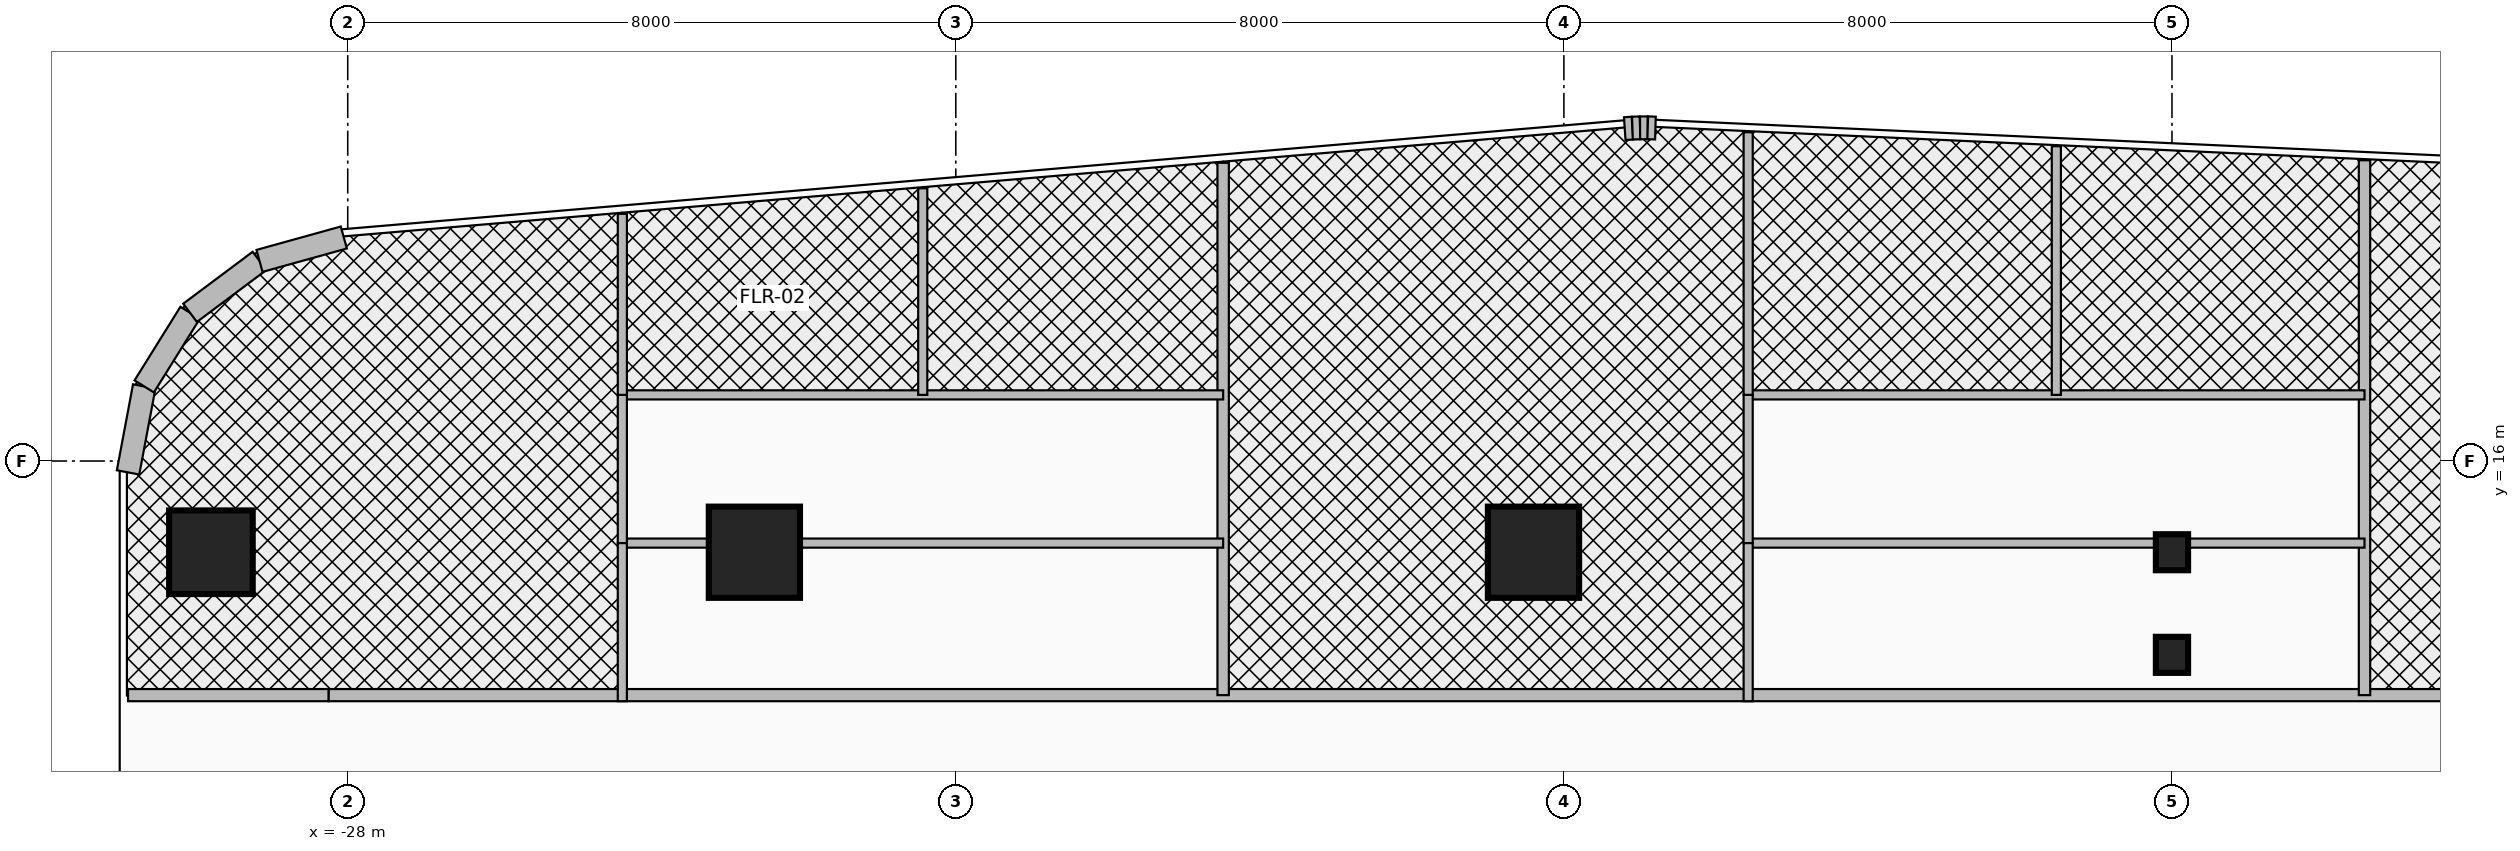
"""IFC4 building model, lengths in metres.
Left out: names, types, materials, properties, quantities, classifications, styles, units other than length and angle.
Written with IfcOpenShell. Run it as: python <this file> out.ifc"""

import sys

from ifc_helpers import new_model, si_unit, direction, frame, frame_2d, origin, origin_2d, place, context, subcontext, project, spatial, rectangle, circle, i_section, extrude, source, transform, mapped, element, fill, save


model = new_model("IFC4")
c1 = context("Model", 3, precision=1e-05, world=origin(), true_north=direction((0.0, 1.0)))
c2 = subcontext(c1, "Body", "Model", "MODEL_VIEW")
j1 = project(units=[si_unit("LENGTHUNIT", "METRE"), si_unit("PLANEANGLEUNIT", "RADIAN")], contexts=[c1])
p1 = place(None, origin())
s1 = spatial("IfcSite", under=j1, at=p1, CompositionType="ELEMENT")
p2 = place(p1, origin())
s2 = spatial("IfcBuilding", under=s1, at=p2, CompositionType="ELEMENT")
p3 = place(p2, frame((0.0, 0.0, 109.4)))
s3 = spatial("IfcBuildingStorey", under=s2, at=p3, CompositionType="ELEMENT", Elevation=109.4)
m1 = source(origin(), c2, "Body", "SweptSolid", [
    extrude(circle(Radius=0.55, at=origin_2d()), origin(), (0.0, 0.0, 1.0), 3.7),
])
p4 = place(p3, frame((-29.8, 14.8, 0.0), z_axis=(0.0, 0.0, 1.0), x_axis=(1.0, 0.0, 0.0)))
e1 = element("IfcColumn", 1, at=p4, inside=s3, PredefinedType="COLUMN", context=c2, shape_type="MappedRepresentation", body=[
    mapped(m1, transform((0.0, 0.0, 0.0), x_axis=(1.0, 0.0, 0.0), y_axis=(0.0, 1.0, 0.0), z_axis=(0.0, 0.0, 1.0), scale=1.0)),
])
m2 = source(origin(), c2, "Body", "SweptSolid", [
    extrude(rectangle(XDim=1.2, YDim=1.2, at=origin_2d()), origin(), (0.0, 0.0, 1.0), 3.7),
])
for number, where, z_axis, x_axis in (
    (2, (-22.65, 14.8, 0.0), (0.0, 0.0, 1.0), (1.0, 0.0, 0.0)),
    (3, (-12.4, 14.8, 0.0), (0.0, 0.0, 1.0), (1.0, 0.0, 0.0)),
):
    element("IfcColumn", number, at=place(p3, frame(where, z_axis=z_axis, x_axis=x_axis)), inside=s3, PredefinedType="COLUMN", context=c2, shape_type="MappedRepresentation", body=[
        mapped(m2, transform((0.0, 0.0, 0.0), x_axis=(1.0, 0.0, 0.0), y_axis=(0.0, 1.0, 0.0), z_axis=(0.0, 0.0, 1.0), scale=1.0)),
    ])
m3 = source(origin(), c2, "Body", "SweptSolid", [
    extrude(i_section(OverallWidth=0.424, OverallDepth=0.474, WebThickness=0.048, FlangeThickness=0.077, at=origin_2d()), origin(), (0.0, 0.0, 1.0), 3.7),
])
for number, where, z_axis, x_axis in (
    (4, (-4.0, 13.45, 0.0), (0.0, 0.0, 1.0), (1.0, 0.0, 0.0)),
    (5, (-4.0, 14.8, 0.0), (0.0, 0.0, 1.0), (1.0, 0.0, 0.0)),
):
    element("IfcColumn", number, at=place(p3, frame(where, z_axis=z_axis, x_axis=x_axis)), inside=s3, PredefinedType="COLUMN", context=c2, shape_type="MappedRepresentation", body=[
        mapped(m3, transform((0.0, 0.0, 0.0), x_axis=(1.0, 0.0, 0.0), y_axis=(0.0, 1.0, 0.0), z_axis=(0.0, 0.0, 1.0), scale=1.0)),
    ])
p5 = place(p3, frame((-30.89, 15.85, 0.0), z_axis=(0.0, 0.0, 1.0), x_axis=(0.184557499391, 0.982821718023, 0.0)))
e6 = element("IfcWall", 6, at=p5, inside=s3, PredefinedType="SOLIDWALL", context=c2, shape_type="SweptSolid", body=[
    extrude(rectangle(XDim=1.151, YDim=0.3, at=frame_2d((0.575, 0.0))), origin(), (0.0, 0.0, 1.0), 3.46),
])
p6 = place(p3, frame((-30.677, 16.981, 0.0), z_axis=(0.0, 0.0, 1.0), x_axis=(0.52880576008, 0.848742875143, 0.0)))
e7 = element("IfcWall", 7, at=p6, inside=s3, PredefinedType="SOLIDWALL", context=c2, shape_type="SweptSolid", body=[
    extrude(rectangle(XDim=1.141, YDim=0.3, at=frame_2d((0.57, 0.0))), origin(), (0.0, 0.0, 1.0), 3.46),
])
p7 = place(p3, frame((-30.074, 17.95, 0.0), z_axis=(0.0, 0.0, 1.0), x_axis=(0.800975009324, 0.598697782223, 0.0)))
e8 = element("IfcWall", 8, at=p7, inside=s3, PredefinedType="SOLIDWALL", context=c2, shape_type="SweptSolid", body=[
    extrude(rectangle(XDim=1.141, YDim=0.3, at=frame_2d((0.57, 0.0))), origin(), (0.0, 0.0, 1.0), 3.46),
])
p8 = place(p3, frame((-29.161, 18.633, 0.0), z_axis=(0.0, 0.0, 1.0), x_axis=(0.963624193367, 0.267260947313, 0.0)))
e9 = element("IfcWall", 9, at=p8, inside=s3, PredefinedType="SOLIDWALL", context=c2, shape_type="SweptSolid", body=[
    extrude(rectangle(XDim=1.151, YDim=0.3, at=frame_2d((0.575, 0.0))), origin(), (0.0, 0.0, 1.0), 3.46),
])
p9 = place(p3, frame((-11.199, 20.373, 0.0), z_axis=(0.0, 0.0, 1.0), x_axis=(0.997567332166, 0.069709524416, 0.0)))
e10 = element("IfcWall", 10, at=p9, inside=s3, PredefinedType="SOLIDWALL", context=c2, shape_type="SweptSolid", body=[
    extrude(rectangle(XDim=0.102, YDim=0.3, at=frame_2d((0.051, 0.0))), origin(), (0.0, 0.0, 1.0), 3.46),
])
p10 = place(p3, frame((-11.098, 20.38, 0.0), z_axis=(0.0, 0.0, 1.0), x_axis=(0.999334672785, 0.03647206835, 0.0)))
e11 = element("IfcWall", 11, at=p10, inside=s3, PredefinedType="SOLIDWALL", context=c2, shape_type="SweptSolid", body=[
    extrude(rectangle(XDim=0.1, YDim=0.3, at=frame_2d((0.05, 0.0))), origin(), (0.0, 0.0, 1.0), 3.46),
])
p11 = place(p3, frame((-10.998, 20.383, 0.0), z_axis=(0.0, 0.0, 1.0), x_axis=(0.999997054401, 0.002427177317, 0.0)))
e12 = element("IfcWall", 12, at=p11, inside=s3, PredefinedType="SOLIDWALL", context=c2, shape_type="SweptSolid", body=[
    extrude(rectangle(XDim=0.101, YDim=0.3, at=frame_2d((0.05, 0.0))), origin(), (0.0, 0.0, 1.0), 3.46),
])
p12 = place(p3, frame((-10.897, 20.384, 0.0), z_axis=(0.0, 0.0, 1.0), x_axis=(0.999584209171, -0.02883415988, 0.0)))
e13 = element("IfcWall", 13, at=p12, inside=s3, PredefinedType="SOLIDWALL", context=c2, shape_type="SweptSolid", body=[
    extrude(rectangle(XDim=0.102, YDim=0.3, at=frame_2d((0.051, 0.0))), origin(), (0.0, 0.0, 1.0), 3.46),
])
p13 = place(p3, frame((-30.89, 12.92, 0.0), z_axis=(0.0, 0.0, 1.0), x_axis=(1.0, 0.0, 0.0)))
e14 = element("IfcWall", 14, at=p13, inside=s3, PredefinedType="PARTITIONING", context=c2, shape_type="SweptSolid", body=[
    extrude(rectangle(XDim=2.64, YDim=0.16, at=frame_2d((1.32, 0.0))), origin(), (0.0, 0.0, 1.0), 2.896),
])
p14 = place(p3, frame((-28.25, 12.92, 0.0), z_axis=(0.0, 0.0, 1.0), x_axis=(1.0, 0.0, 0.0)))
e15 = element("IfcWall", 15, at=p14, inside=s3, PredefinedType="PARTITIONING", context=c2, shape_type="SweptSolid", body=[
    extrude(rectangle(XDim=41.8, YDim=0.16, at=frame_2d((20.9, 0.0))), origin(), (0.0, 0.0, 1.0), 2.666),
])
p15 = place(p14, frame((1.456, 0.0, 0.0)))
e16 = element("IfcOpeningElement", 16, at=p15, cuts=e15, PredefinedType="OPENING", context=c2, shape_type="SweptSolid", body=[
    extrude(rectangle(XDim=0.95, YDim=2.15, at=frame_2d((0.475, 1.075))), frame((0.0, 0.095, 0.0), z_axis=(0.0, -1.0, 0.0), x_axis=(1.0, 0.0, 0.0)), (0.0, 0.0, 1.0), 0.19),
])
p16 = place(p14, frame((14.167, 0.0, 0.0)))
e17 = element("IfcOpeningElement", 17, at=p16, cuts=e15, PredefinedType="OPENING", context=c2, shape_type="SweptSolid", body=[
    extrude(rectangle(XDim=0.95, YDim=2.15, at=frame_2d((0.475, 1.075))), frame((0.0, 0.095, 0.0), z_axis=(0.0, -1.0, 0.0), x_axis=(1.0, 0.0, 0.0)), (0.0, 0.0, 1.0), 0.19),
])
p17 = place(p14, frame((30.587, 0.0, 0.0)))
e18 = element("IfcOpeningElement", 18, at=p17, cuts=e15, PredefinedType="OPENING", context=c2, shape_type="SweptSolid", body=[
    extrude(rectangle(XDim=0.95, YDim=2.15, at=frame_2d((0.475, 1.075))), frame((0.0, 0.095, 0.0), z_axis=(0.0, -1.0, 0.0), x_axis=(1.0, 0.0, 0.0)), (0.0, 0.0, 1.0), 0.19),
])
p18 = place(p3, frame((-16.483, 12.92, 0.0), z_axis=(0.0, 0.0, 1.0), x_axis=(0.0, 1.0, 0.0)))
e19 = element("IfcWall", 19, at=p18, inside=s3, PredefinedType="PARTITIONING", context=c2, shape_type="SweptSolid", body=[
    extrude(rectangle(XDim=7.004, YDim=0.15, at=frame_2d((3.502, 0.0))), origin(), (0.0, 0.0, 1.0), 2.666),
])
p19 = place(p3, frame((-1.467, 12.92, 0.0), z_axis=(0.0, 0.0, 1.0), x_axis=(0.0, 1.0, 0.0)))
e20 = element("IfcWall", 20, at=p19, inside=s3, PredefinedType="PARTITIONING", context=c2, shape_type="SweptSolid", body=[
    extrude(rectangle(XDim=7.037, YDim=0.15, at=frame_2d((3.518, 0.0))), origin(), (0.0, 0.0, 1.0), 2.666),
])
p20 = place(p3, frame((-24.387, 14.92, 0.0), z_axis=(0.0, 0.0, 1.0), x_axis=(1.0, 0.0, 0.0)))
e21 = element("IfcWall", 21, at=p20, inside=s3, PredefinedType="PARTITIONING", context=c2, shape_type="SweptSolid", body=[
    extrude(rectangle(XDim=7.904, YDim=0.12, at=frame_2d((3.952, 0.0))), origin(), (0.0, 0.0, 1.0), 2.666),
])
p21 = place(p3, frame((-24.387, 16.87, 0.0), z_axis=(0.0, 0.0, 1.0), x_axis=(1.0, 0.0, 0.0)))
e22 = element("IfcWall", 22, at=p21, inside=s3, PredefinedType="PARTITIONING", context=c2, shape_type="SweptSolid", body=[
    extrude(rectangle(XDim=7.904, YDim=0.12, at=frame_2d((3.952, 0.0))), origin(), (0.0, 0.0, 1.0), 3.46),
])
p22 = place(p3, frame((-24.387, 14.92, 0.0), z_axis=(0.0, 0.0, 1.0), x_axis=(0.0, 1.0, 0.0)))
e23 = element("IfcWall", 23, at=p22, inside=s3, PredefinedType="PARTITIONING", context=c2, shape_type="SweptSolid", body=[
    extrude(rectangle(XDim=1.95, YDim=0.12, at=frame_2d((0.975, 0.0))), origin(), (0.0, 0.0, 1.0), 2.666),
])
p23 = place(p22, frame((0.62, 0.0, 0.0)))
e24 = element("IfcOpeningElement", 24, at=p23, cuts=e23, PredefinedType="OPENING", context=c2, shape_type="SweptSolid", body=[
    extrude(rectangle(XDim=0.85, YDim=2.1, at=frame_2d((0.425, 1.05))), frame((0.0, 0.075, 0.0), z_axis=(0.0, -1.0, 0.0), x_axis=(1.0, 0.0, 0.0)), (0.0, 0.0, 1.0), 0.15),
])
p24 = place(p3, frame((-24.387, 12.84, 0.0), z_axis=(0.0, 0.0, 1.0), x_axis=(0.0, 1.0, 0.0)))
e25 = element("IfcWall", 25, at=p24, inside=s3, PredefinedType="PARTITIONING", context=c2, shape_type="SweptSolid", body=[
    extrude(rectangle(XDim=2.08, YDim=0.12, at=frame_2d((1.04, 0.0))), origin(), (0.0, 0.0, 1.0), 2.666),
])
p25 = place(p24, frame((0.3, 0.0, 0.0)))
e26 = element("IfcOpeningElement", 26, at=p25, cuts=e25, PredefinedType="OPENING", context=c2, shape_type="SweptSolid", body=[
    extrude(rectangle(XDim=0.9, YDim=2.1, at=frame_2d((0.45, 1.05))), frame((0.0, 0.075, 0.0), z_axis=(0.0, -1.0, 0.0), x_axis=(1.0, 0.0, 0.0)), (0.0, 0.0, 1.0), 0.15),
])
p26 = place(p3, frame((-24.387, 16.87, 0.0), z_axis=(0.0, 0.0, 1.0), x_axis=(0.0, 1.0, 0.0)))
e27 = element("IfcWall", 27, at=p26, inside=s3, PredefinedType="PARTITIONING", context=c2, shape_type="SweptSolid", body=[
    extrude(rectangle(XDim=2.382, YDim=0.12, at=frame_2d((1.191, 0.0))), origin(), (0.0, 0.0, 1.0), 3.46),
])
p27 = place(p26, frame((0.741, 0.0, 0.0)))
e28 = element("IfcOpeningElement", 28, at=p27, cuts=e27, PredefinedType="OPENING", context=c2, shape_type="SweptSolid", body=[
    extrude(rectangle(XDim=0.9, YDim=2.1, at=frame_2d((0.45, 1.05))), frame((0.0, 0.075, 0.0), z_axis=(0.0, -1.0, 0.0), x_axis=(1.0, 0.0, 0.0)), (0.0, 0.0, 1.0), 0.15),
])
p28 = place(p3, frame((-20.435, 16.87, 0.0), z_axis=(0.0, 0.0, 1.0), x_axis=(0.0, 1.0, 0.0)))
e29 = element("IfcWall", 29, at=p28, inside=s3, PredefinedType="PARTITIONING", context=c2, shape_type="SweptSolid", body=[
    extrude(rectangle(XDim=2.718, YDim=0.12, at=frame_2d((1.359, 0.0))), origin(), (0.0, 0.0, 1.0), 3.46),
])
p29 = place(p28, frame((0.9, 0.0, 0.0)))
e30 = element("IfcOpeningElement", 30, at=p29, cuts=e29, PredefinedType="OPENING", context=c2, shape_type="SweptSolid", body=[
    extrude(rectangle(XDim=0.9, YDim=2.1, at=frame_2d((0.45, 1.05))), frame((0.0, 0.075, 0.0), z_axis=(0.0, -1.0, 0.0), x_axis=(1.0, 0.0, 0.0)), (0.0, 0.0, 1.0), 0.15),
])
p30 = place(p3, frame((-9.576, 14.92, 0.0), z_axis=(0.0, 0.0, 1.0), x_axis=(1.0, 0.0, 0.0)))
e31 = element("IfcWall", 31, at=p30, inside=s3, PredefinedType="PARTITIONING", context=c2, shape_type="SweptSolid", body=[
    extrude(rectangle(XDim=8.109, YDim=0.12, at=frame_2d((4.054, 0.0))), origin(), (0.0, 0.0, 1.0), 2.666),
])
p31 = place(p3, frame((-9.576, 16.87, 0.0), z_axis=(0.0, 0.0, 1.0), x_axis=(1.0, 0.0, 0.0)))
e32 = element("IfcWall", 32, at=p31, inside=s3, PredefinedType="PARTITIONING", context=c2, shape_type="SweptSolid", body=[
    extrude(rectangle(XDim=8.109, YDim=0.12, at=frame_2d((4.054, 0.0))), origin(), (0.0, 0.0, 1.0), 3.46),
])
p32 = place(p3, frame((-9.576, 14.92, 0.0), z_axis=(0.0, 0.0, 1.0), x_axis=(0.0, 1.0, 0.0)))
e33 = element("IfcWall", 33, at=p32, inside=s3, PredefinedType="PARTITIONING", context=c2, shape_type="SweptSolid", body=[
    extrude(rectangle(XDim=1.95, YDim=0.12, at=frame_2d((0.975, 0.0))), origin(), (0.0, 0.0, 1.0), 2.666),
])
p33 = place(p32, frame((0.55, 0.0, 0.0)))
e34 = element("IfcOpeningElement", 34, at=p33, cuts=e33, PredefinedType="OPENING", context=c2, shape_type="SweptSolid", body=[
    extrude(rectangle(XDim=0.85, YDim=2.1, at=frame_2d((0.425, 1.05))), frame((0.0, 0.075, 0.0), z_axis=(0.0, -1.0, 0.0), x_axis=(1.0, 0.0, 0.0)), (0.0, 0.0, 1.0), 0.15),
])
p34 = place(p3, frame((-9.576, 12.84, 0.0), z_axis=(0.0, 0.0, 1.0), x_axis=(0.0, 1.0, 0.0)))
e35 = element("IfcWall", 35, at=p34, inside=s3, PredefinedType="PARTITIONING", context=c2, shape_type="SweptSolid", body=[
    extrude(rectangle(XDim=2.08, YDim=0.12, at=frame_2d((1.04, 0.0))), origin(), (0.0, 0.0, 1.0), 2.666),
])
p35 = place(p34, frame((0.55, 0.0, 0.0)))
e36 = element("IfcOpeningElement", 36, at=p35, cuts=e35, PredefinedType="OPENING", context=c2, shape_type="SweptSolid", body=[
    extrude(rectangle(XDim=0.9, YDim=2.1, at=frame_2d((0.45, 1.05))), frame((0.0, 0.075, 0.0), z_axis=(0.0, -1.0, 0.0), x_axis=(1.0, 0.0, 0.0)), (0.0, 0.0, 1.0), 0.15),
])
p36 = place(p3, frame((-9.576, 16.87, 0.0), z_axis=(0.0, 0.0, 1.0), x_axis=(0.0, 1.0, 0.0)))
e37 = element("IfcWall", 37, at=p36, inside=s3, PredefinedType="PARTITIONING", context=c2, shape_type="SweptSolid", body=[
    extrude(rectangle(XDim=3.455, YDim=0.12, at=frame_2d((1.728, 0.0))), origin(), (0.0, 0.0, 1.0), 3.46),
])
p37 = place(p36, frame((1.278, 0.0, 0.0)))
e38 = element("IfcOpeningElement", 38, at=p37, cuts=e37, PredefinedType="OPENING", context=c2, shape_type="SweptSolid", body=[
    extrude(rectangle(XDim=0.9, YDim=2.1, at=frame_2d((0.45, 1.05))), frame((0.0, 0.075, 0.0), z_axis=(0.0, -1.0, 0.0), x_axis=(1.0, 0.0, 0.0)), (0.0, 0.0, 1.0), 0.15),
])
p38 = place(p3, frame((-5.521, 16.87, 0.0), z_axis=(0.0, 0.0, 1.0), x_axis=(0.0, 1.0, 0.0)))
e39 = element("IfcWall", 39, at=p38, inside=s3, PredefinedType="PARTITIONING", context=c2, shape_type="SweptSolid", body=[
    extrude(rectangle(XDim=3.271, YDim=0.12, at=frame_2d((1.635, 0.0))), origin(), (0.0, 0.0, 1.0), 3.46),
])
p39 = place(p38, frame((0.9, 0.0, 0.0)))
e40 = element("IfcOpeningElement", 40, at=p39, cuts=e39, PredefinedType="OPENING", context=c2, shape_type="SweptSolid", body=[
    extrude(rectangle(XDim=0.9, YDim=2.1, at=frame_2d((0.45, 1.05))), frame((0.0, 0.075, 0.0), z_axis=(0.0, -1.0, 0.0), x_axis=(1.0, 0.0, 0.0)), (0.0, 0.0, 1.0), 0.15),
])
p40 = place(p15, frame((0.95, 0.0, 0.0), z_axis=(0.0, 0.0, 1.0), x_axis=(-1.0, 0.0, 0.0)))
e41 = element("IfcDoor", 41, at=p40, inside=s3, OperationType="SINGLE_SWING_LEFT", PredefinedType="DOOR", context=c2, shape_type="SweptSolid", body=[
    extrude(rectangle(XDim=0.95, YDim=2.15, at=frame_2d((0.475, 1.075))), frame((0.0, 0.025, 0.0), z_axis=(0.0, -1.0, 0.0), x_axis=(1.0, 0.0, 0.0)), (0.0, 0.0, 1.0), 0.05),
])
fill(e16, e41)
p41 = place(p23, origin())
e42 = element("IfcDoor", 42, at=p41, inside=s3, OperationType="SINGLE_SWING_RIGHT", PredefinedType="DOOR", context=c2, shape_type="SweptSolid", body=[
    extrude(rectangle(XDim=0.85, YDim=2.1, at=frame_2d((0.425, 1.05))), frame((0.0, 0.025, 0.0), z_axis=(0.0, -1.0, 0.0), x_axis=(1.0, 0.0, 0.0)), (0.0, 0.0, 1.0), 0.05),
])
fill(e24, e42)
p42 = place(p25, origin())
e43 = element("IfcDoor", 43, at=p42, inside=s3, OperationType="SINGLE_SWING_LEFT", PredefinedType="DOOR", context=c2, shape_type="SweptSolid", body=[
    extrude(rectangle(XDim=0.9, YDim=2.1, at=frame_2d((0.45, 1.05))), frame((0.0, 0.025, 0.0), z_axis=(0.0, -1.0, 0.0), x_axis=(1.0, 0.0, 0.0)), (0.0, 0.0, 1.0), 0.05),
])
fill(e26, e43)
p43 = place(p27, origin())
e44 = element("IfcDoor", 44, at=p43, inside=s3, OperationType="SINGLE_SWING_RIGHT", PredefinedType="DOOR", context=c2, shape_type="SweptSolid", body=[
    extrude(rectangle(XDim=0.9, YDim=2.1, at=frame_2d((0.45, 1.05))), frame((0.0, 0.025, 0.0), z_axis=(0.0, -1.0, 0.0), x_axis=(1.0, 0.0, 0.0)), (0.0, 0.0, 1.0), 0.05),
])
fill(e28, e44)
p44 = place(p29, frame((0.9, 0.0, 0.0), z_axis=(0.0, 0.0, 1.0), x_axis=(-1.0, 0.0, 0.0)))
e45 = element("IfcDoor", 45, at=p44, inside=s3, OperationType="SINGLE_SWING_LEFT", PredefinedType="DOOR", context=c2, shape_type="SweptSolid", body=[
    extrude(rectangle(XDim=0.9, YDim=2.1, at=frame_2d((0.45, 1.05))), frame((0.0, 0.025, 0.0), z_axis=(0.0, -1.0, 0.0), x_axis=(1.0, 0.0, 0.0)), (0.0, 0.0, 1.0), 0.05),
])
fill(e30, e45)
p45 = place(p16, origin())
e46 = element("IfcDoor", 46, at=p45, inside=s3, OperationType="SINGLE_SWING_RIGHT", PredefinedType="DOOR", context=c2, shape_type="SweptSolid", body=[
    extrude(rectangle(XDim=0.95, YDim=2.15, at=frame_2d((0.475, 1.075))), frame((0.0, 0.025, 0.0), z_axis=(0.0, -1.0, 0.0), x_axis=(1.0, 0.0, 0.0)), (0.0, 0.0, 1.0), 0.05),
])
fill(e17, e46)
p46 = place(p33, origin())
e47 = element("IfcDoor", 47, at=p46, inside=s3, OperationType="SINGLE_SWING_LEFT", PredefinedType="DOOR", context=c2, shape_type="SweptSolid", body=[
    extrude(rectangle(XDim=0.85, YDim=2.1, at=frame_2d((0.425, 1.05))), frame((0.0, 0.025, 0.0), z_axis=(0.0, -1.0, 0.0), x_axis=(1.0, 0.0, 0.0)), (0.0, 0.0, 1.0), 0.05),
])
fill(e34, e47)
p47 = place(p35, origin())
e48 = element("IfcDoor", 48, at=p47, inside=s3, OperationType="SINGLE_SWING_RIGHT", PredefinedType="DOOR", context=c2, shape_type="SweptSolid", body=[
    extrude(rectangle(XDim=0.9, YDim=2.1, at=frame_2d((0.45, 1.05))), frame((0.0, 0.025, 0.0), z_axis=(0.0, -1.0, 0.0), x_axis=(1.0, 0.0, 0.0)), (0.0, 0.0, 1.0), 0.05),
])
fill(e36, e48)
p48 = place(p37, frame((0.9, 0.0, 0.0), z_axis=(0.0, 0.0, 1.0), x_axis=(-1.0, 0.0, 0.0)))
e49 = element("IfcDoor", 49, at=p48, inside=s3, OperationType="SINGLE_SWING_LEFT", PredefinedType="DOOR", context=c2, shape_type="SweptSolid", body=[
    extrude(rectangle(XDim=0.9, YDim=2.1, at=frame_2d((0.45, 1.05))), frame((0.0, 0.025, 0.0), z_axis=(0.0, -1.0, 0.0), x_axis=(1.0, 0.0, 0.0)), (0.0, 0.0, 1.0), 0.05),
])
fill(e38, e49)
p49 = place(p39, origin())
e50 = element("IfcDoor", 50, at=p49, inside=s3, OperationType="SINGLE_SWING_RIGHT", PredefinedType="DOOR", context=c2, shape_type="SweptSolid", body=[
    extrude(rectangle(XDim=0.9, YDim=2.1, at=frame_2d((0.45, 1.05))), frame((0.0, 0.025, 0.0), z_axis=(0.0, -1.0, 0.0), x_axis=(1.0, 0.0, 0.0)), (0.0, 0.0, 1.0), 0.05),
])
fill(e40, e50)
save(model, sys.argv[1])
